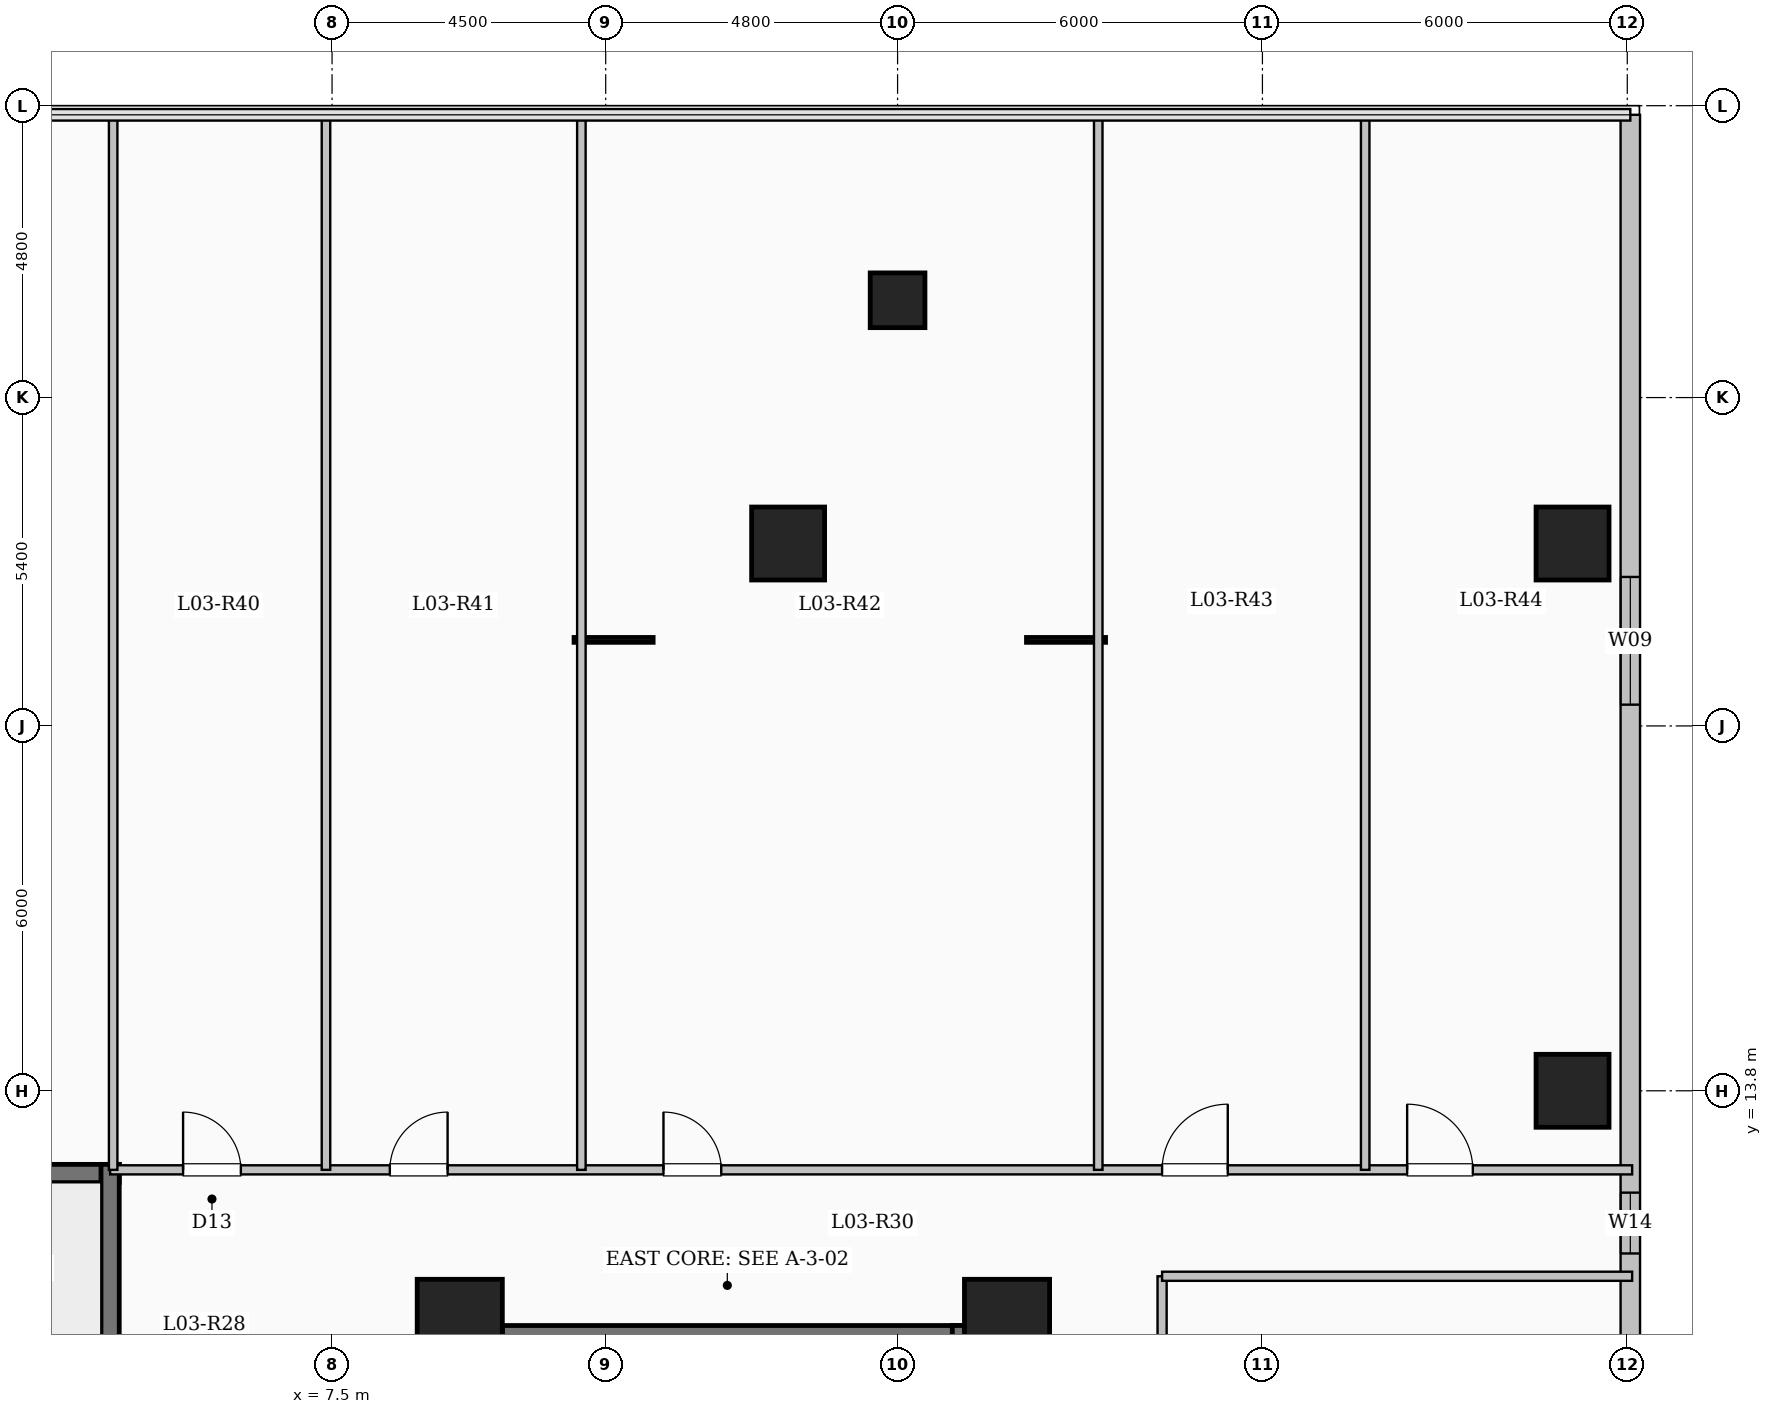
"""IFC4 building model, lengths in metres.
Left out: names, types, materials, properties, quantities, classifications, styles, units other than length and angle.
Written with IfcOpenShell. Run it as: python <this file> out.ifc"""

import sys

from ifc_helpers import new_model, si_unit, direction, frame, frame_2d, origin, origin_2d, place, context, subcontext, project, spatial, rectangle, extrude, element, fill, save


model = new_model("IFC4")
c1 = context("Model", 3, precision=1e-05, world=origin(), true_north=direction((0.0, 1.0)))
c2 = subcontext(c1, "Body", "Model", "MODEL_VIEW")
j1 = project(units=[si_unit("LENGTHUNIT", "METRE"), si_unit("PLANEANGLEUNIT", "RADIAN")], contexts=[c1])
p1 = place(None, origin())
s1 = spatial("IfcSite", under=j1, at=p1, CompositionType="ELEMENT")
p2 = place(p1, origin())
s2 = spatial("IfcBuilding", under=s1, at=p2, CompositionType="ELEMENT")
p3 = place(p2, frame((0.0, 0.0, 14.4)))
s3 = spatial("IfcBuildingStorey", under=s2, at=p3, CompositionType="ELEMENT", Elevation=14.4)
for number, where, z_axis, x_axis in (
    (1, (9.6, 10.0, 0.0), (0.0, 0.0, 1.0), (1.0, 0.0, 0.0)),
    (2, (18.6, 10.0, 0.0), (0.0, 0.0, 1.0), (1.0, 0.0, 0.0)),
):
    element("IfcColumn", number, at=place(p3, frame(where, z_axis=z_axis, x_axis=x_axis)), inside=s3, PredefinedType="COLUMN", context=c2, shape_type="SweptSolid", body=[
        extrude(rectangle(XDim=1.4, YDim=1.4, at=origin_2d()), origin(), (0.0, 0.0, 1.0), 4.5),
    ])
p4 = place(p3, frame((16.8, 26.8, 0.0), z_axis=(0.0, 0.0, 1.0), x_axis=(1.0, 0.0, 0.0)))
e3 = element("IfcColumn", 3, at=p4, inside=s3, PredefinedType="COLUMN", context=c2, shape_type="SweptSolid", body=[
    extrude(rectangle(XDim=0.9, YDim=0.9, at=origin_2d()), origin(), (0.0, 0.0, 1.0), 4.28),
])
for number, where, z_axis, x_axis in (
    (4, (15.0, 22.8, 0.0), (0.0, 0.0, 1.0), (1.0, 0.0, 0.0)),
    (5, (27.9, 22.8, 0.0), (0.0, 0.0, 1.0), (1.0, 0.0, 0.0)),
    (6, (27.9, 13.8, 0.0), (0.0, 0.0, 1.0), (1.0, 0.0, 0.0)),
):
    element("IfcColumn", number, at=place(p3, frame(where, z_axis=z_axis, x_axis=x_axis)), inside=s3, PredefinedType="COLUMN", context=c2, shape_type="SweptSolid", body=[
        extrude(rectangle(XDim=1.2, YDim=1.2, at=origin_2d()), origin(), (0.0, 0.0, 1.0), 4.5),
    ])
p5 = place(p3, frame((28.85, 29.85, 0.0), z_axis=(0.0, 0.0, 1.0), x_axis=(0.0, -1.0, 0.0)))
e7 = element("IfcWall", 7, at=p5, inside=s3, PredefinedType="SOLIDWALL", context=c2, shape_type="SweptSolid", body=[
    extrude(rectangle(XDim=56.1, YDim=0.32, at=frame_2d((28.05, 0.0))), origin(), (0.0, 0.0, 1.0), 4.2),
])
p6 = place(p5, frame((7.6, 0.0, 0.9)))
e8 = element("IfcOpeningElement", 8, at=p6, cuts=e7, PredefinedType="OPENING", context=c2, shape_type="SweptSolid", body=[
    extrude(rectangle(XDim=2.1, YDim=2.0, at=frame_2d((1.05, 1.0))), frame((0.0, 0.17, 0.0), z_axis=(0.0, -1.0, 0.0), x_axis=(1.0, 0.0, 0.0)), (0.0, 0.0, 1.0), 0.34),
])
p7 = place(p5, frame((17.725, 0.0, 0.95)))
e9 = element("IfcOpeningElement", 9, at=p7, cuts=e7, PredefinedType="OPENING", context=c2, shape_type="SweptSolid", body=[
    extrude(rectangle(XDim=1.0, YDim=1.5, at=frame_2d((0.5, 0.75))), frame((0.0, 0.17, 0.0), z_axis=(0.0, -1.0, 0.0), x_axis=(1.0, 0.0, 0.0)), (0.0, 0.0, 1.0), 0.34),
])
p8 = place(p5, frame((27.05, 0.0, 0.9)))
e10 = element("IfcOpeningElement", 10, at=p8, cuts=e7, PredefinedType="OPENING", context=c2, shape_type="SweptSolid", body=[
    extrude(rectangle(XDim=2.1, YDim=2.0, at=frame_2d((1.05, 1.0))), frame((0.0, 0.17, 0.0), z_axis=(0.0, -1.0, 0.0), x_axis=(1.0, 0.0, 0.0)), (0.0, 0.0, 1.0), 0.34),
])
p9 = place(p5, frame((37.758, 0.0, 0.9)))
e11 = element("IfcOpeningElement", 11, at=p9, cuts=e7, PredefinedType="OPENING", context=c2, shape_type="SweptSolid", body=[
    extrude(rectangle(XDim=1.7, YDim=1.9, at=frame_2d((0.85, 0.95))), frame((0.0, 0.17, 0.0), z_axis=(0.0, -1.0, 0.0), x_axis=(1.0, 0.0, 0.0)), (0.0, 0.0, 1.0), 0.34),
])
p10 = place(p3, frame((10.0, 9.79, 0.0), z_axis=(0.0, 0.0, 1.0), x_axis=(1.0, 0.0, 0.0)))
e12 = element("IfcWall", 12, at=p10, inside=s3, PredefinedType="SHEAR", context=c2, shape_type="SweptSolid", body=[
    extrude(rectangle(XDim=8.0, YDim=0.3, at=frame_2d((4.0, 0.0))), origin(), (0.0, 0.0, 1.0), 4.5),
])
for number, where, z_axis, x_axis in (
    (13, (10.15, 6.35, 0.0), (0.0, 0.0, 1.0), (0.0, 1.0, 0.0)),
    (14, (17.85, 6.35, 0.0), (0.0, 0.0, 1.0), (0.0, 1.0, 0.0)),
):
    element("IfcWall", number, at=place(p3, frame(where, z_axis=z_axis, x_axis=x_axis)), inside=s3, PredefinedType="SHEAR", context=c2, shape_type="SweptSolid", body=[
        extrude(rectangle(XDim=3.59, YDim=0.3, at=frame_2d((1.795, 0.0))), origin(), (0.0, 0.0, 1.0), 4.5),
    ])
p11 = place(p3, frame((-4.0, 12.44, 0.0), z_axis=(0.0, 0.0, 1.0), x_axis=(1.0, 0.0, 0.0)))
e15 = element("IfcWall", 15, at=p11, inside=s3, PredefinedType="SHEAR", context=c2, shape_type="SweptSolid", body=[
    extrude(rectangle(XDim=8.0, YDim=0.3, at=frame_2d((4.0, 0.0))), origin(), (0.0, 0.0, 1.0), 4.5),
])
p12 = place(p3, frame((3.85, 9.0, 0.0), z_axis=(0.0, 0.0, 1.0), x_axis=(0.0, 1.0, 0.0)))
e16 = element("IfcWall", 16, at=p12, inside=s3, PredefinedType="SHEAR", context=c2, shape_type="SweptSolid", body=[
    extrude(rectangle(XDim=3.59, YDim=0.3, at=frame_2d((1.795, 0.0))), origin(), (0.0, 0.0, 1.0), 4.5),
])
p13 = place(p3, frame((3.85, 12.5, 0.0), z_axis=(0.0, 0.0, 1.0), x_axis=(1.0, 0.0, 0.0)))
e17 = element("IfcWall", 17, at=p13, inside=s3, PredefinedType="PARTITIONING", context=c2, shape_type="SweptSolid", body=[
    extrude(rectangle(XDim=25.03, YDim=0.15, at=frame_2d((12.515, 0.0))), origin(), (0.0, 0.0, 1.0), 4.2),
])
p14 = place(p13, frame((1.2, 0.0, 0.0)))
e18 = element("IfcOpeningElement", 18, at=p14, cuts=e17, PredefinedType="OPENING", context=c2, shape_type="SweptSolid", body=[
    extrude(rectangle(XDim=0.95, YDim=2.15, at=frame_2d((0.475, 1.075))), frame((0.0, 0.085, 0.0), z_axis=(0.0, -1.0, 0.0), x_axis=(1.0, 0.0, 0.0)), (0.0, 0.0, 1.0), 0.17),
])
p15 = place(p13, frame((4.6, 0.0, 0.0)))
e19 = element("IfcOpeningElement", 19, at=p15, cuts=e17, PredefinedType="OPENING", context=c2, shape_type="SweptSolid", body=[
    extrude(rectangle(XDim=0.95, YDim=2.15, at=frame_2d((0.475, 1.075))), frame((0.0, 0.085, 0.0), z_axis=(0.0, -1.0, 0.0), x_axis=(1.0, 0.0, 0.0)), (0.0, 0.0, 1.0), 0.17),
])
p16 = place(p13, frame((9.1, 0.0, 0.0)))
e20 = element("IfcOpeningElement", 20, at=p16, cuts=e17, PredefinedType="OPENING", context=c2, shape_type="SweptSolid", body=[
    extrude(rectangle(XDim=0.95, YDim=2.15, at=frame_2d((0.475, 1.075))), frame((0.0, 0.085, 0.0), z_axis=(0.0, -1.0, 0.0), x_axis=(1.0, 0.0, 0.0)), (0.0, 0.0, 1.0), 0.17),
])
p17 = place(p13, frame((17.3, 0.0, 0.0)))
e21 = element("IfcOpeningElement", 21, at=p17, cuts=e17, PredefinedType="OPENING", context=c2, shape_type="SweptSolid", body=[
    extrude(rectangle(XDim=1.08, YDim=2.15, at=frame_2d((0.54, 1.075))), frame((0.0, 0.085, 0.0), z_axis=(0.0, -1.0, 0.0), x_axis=(1.0, 0.0, 0.0)), (0.0, 0.0, 1.0), 0.17),
])
p18 = place(p13, frame((21.33, 0.0, 0.0)))
e22 = element("IfcOpeningElement", 22, at=p18, cuts=e17, PredefinedType="OPENING", context=c2, shape_type="SweptSolid", body=[
    extrude(rectangle(XDim=1.08, YDim=2.15, at=frame_2d((0.54, 1.075))), frame((0.0, 0.085, 0.0), z_axis=(0.0, -1.0, 0.0), x_axis=(1.0, 0.0, 0.0)), (0.0, 0.0, 1.0), 0.17),
])
p19 = place(p3, frame((21.15, -7.25, 0.0), z_axis=(0.0, 0.0, 1.0), x_axis=(0.0, 1.0, 0.0)))
e23 = element("IfcWall", 23, at=p19, inside=s3, PredefinedType="PARTITIONING", context=c2, shape_type="SweptSolid", body=[
    extrude(rectangle(XDim=18.0, YDim=0.15, at=frame_2d((9.0, 0.0))), origin(), (0.0, 0.0, 1.0), 4.2),
])
for number, where, z_axis, x_axis in (
    (24, (3.9, 12.5, 0.0), (0.0, 0.0, 1.0), (0.0, 1.0, 0.0)),
    (25, (7.4, 12.5, 0.0), (0.0, 0.0, 1.0), (0.0, 1.0, 0.0)),
    (26, (11.6, 12.5, 0.0), (0.0, 0.0, 1.0), (0.0, 1.0, 0.0)),
    (27, (20.1, 12.5, 0.0), (0.0, 0.0, 1.0), (0.0, 1.0, 0.0)),
    (28, (24.49, 12.5, 0.0), (0.0, 0.0, 1.0), (0.0, 1.0, 0.0)),
):
    element("IfcWall", number, at=place(p3, frame(where, z_axis=z_axis, x_axis=x_axis)), inside=s3, PredefinedType="PARTITIONING", context=c2, shape_type="SweptSolid", body=[
        extrude(rectangle(XDim=17.38, YDim=0.14, at=frame_2d((8.69, 0.0))), origin(), (0.0, 0.0, 1.0), 4.2),
    ])
p20 = place(p3, frame((21.15, 10.75, 0.0), z_axis=(0.0, 0.0, 1.0), x_axis=(1.0, 0.0, 0.0)))
e29 = element("IfcWall", 29, at=p20, inside=s3, PredefinedType="PARTITIONING", context=c2, shape_type="SweptSolid", body=[
    extrude(rectangle(XDim=7.73, YDim=0.15, at=frame_2d((3.865, 0.0))), origin(), (0.0, 0.0, 1.0), 4.2),
])
p21 = place(p6, origin())
e30 = element("IfcWindow", 30, at=p21, inside=s3, PartitioningType="SINGLE_PANEL", PredefinedType="WINDOW", context=c2, shape_type="SweptSolid", body=[
    extrude(rectangle(XDim=2.1, YDim=2.0, at=frame_2d((1.05, 1.0))), frame((0.0, 0.03, 0.0), z_axis=(0.0, -1.0, 0.0), x_axis=(1.0, 0.0, 0.0)), (0.0, 0.0, 1.0), 0.06),
])
fill(e8, e30)
p22 = place(p7, origin())
e31 = element("IfcWindow", 31, at=p22, inside=s3, PartitioningType="SINGLE_PANEL", PredefinedType="WINDOW", context=c2, shape_type="SweptSolid", body=[
    extrude(rectangle(XDim=1.0, YDim=1.5, at=frame_2d((0.5, 0.75))), frame((0.0, 0.03, 0.0), z_axis=(0.0, -1.0, 0.0), x_axis=(1.0, 0.0, 0.0)), (0.0, 0.0, 1.0), 0.06),
])
fill(e9, e31)
p23 = place(p14, origin())
e32 = element("IfcDoor", 32, at=p23, inside=s3, OperationType="SINGLE_SWING_LEFT", PredefinedType="DOOR", context=c2, shape_type="SweptSolid", body=[
    extrude(rectangle(XDim=0.95, YDim=2.15, at=frame_2d((0.475, 1.075))), frame((0.0, 0.025, 0.0), z_axis=(0.0, -1.0, 0.0), x_axis=(1.0, 0.0, 0.0)), (0.0, 0.0, 1.0), 0.05),
])
fill(e18, e32)
p24 = place(p15, origin())
e33 = element("IfcDoor", 33, at=p24, inside=s3, OperationType="SINGLE_SWING_RIGHT", PredefinedType="DOOR", context=c2, shape_type="SweptSolid", body=[
    extrude(rectangle(XDim=0.95, YDim=2.15, at=frame_2d((0.475, 1.075))), frame((0.0, 0.025, 0.0), z_axis=(0.0, -1.0, 0.0), x_axis=(1.0, 0.0, 0.0)), (0.0, 0.0, 1.0), 0.05),
])
fill(e19, e33)
p25 = place(p16, origin())
e34 = element("IfcDoor", 34, at=p25, inside=s3, OperationType="SINGLE_SWING_LEFT", PredefinedType="DOOR", context=c2, shape_type="SweptSolid", body=[
    extrude(rectangle(XDim=0.95, YDim=2.15, at=frame_2d((0.475, 1.075))), frame((0.0, 0.025, 0.0), z_axis=(0.0, -1.0, 0.0), x_axis=(1.0, 0.0, 0.0)), (0.0, 0.0, 1.0), 0.05),
])
fill(e20, e34)
p26 = place(p17, origin())
e35 = element("IfcDoor", 35, at=p26, inside=s3, OperationType="SINGLE_SWING_RIGHT", PredefinedType="DOOR", context=c2, shape_type="SweptSolid", body=[
    extrude(rectangle(XDim=1.08, YDim=2.15, at=frame_2d((0.54, 1.075))), frame((0.0, 0.025, 0.0), z_axis=(0.0, -1.0, 0.0), x_axis=(1.0, 0.0, 0.0)), (0.0, 0.0, 1.0), 0.05),
])
fill(e21, e35)
p27 = place(p18, origin())
e36 = element("IfcDoor", 36, at=p27, inside=s3, OperationType="SINGLE_SWING_LEFT", PredefinedType="DOOR", context=c2, shape_type="SweptSolid", body=[
    extrude(rectangle(XDim=1.08, YDim=2.15, at=frame_2d((0.54, 1.075))), frame((0.0, 0.025, 0.0), z_axis=(0.0, -1.0, 0.0), x_axis=(1.0, 0.0, 0.0)), (0.0, 0.0, 1.0), 0.05),
])
fill(e22, e36)
save(model, sys.argv[1])
